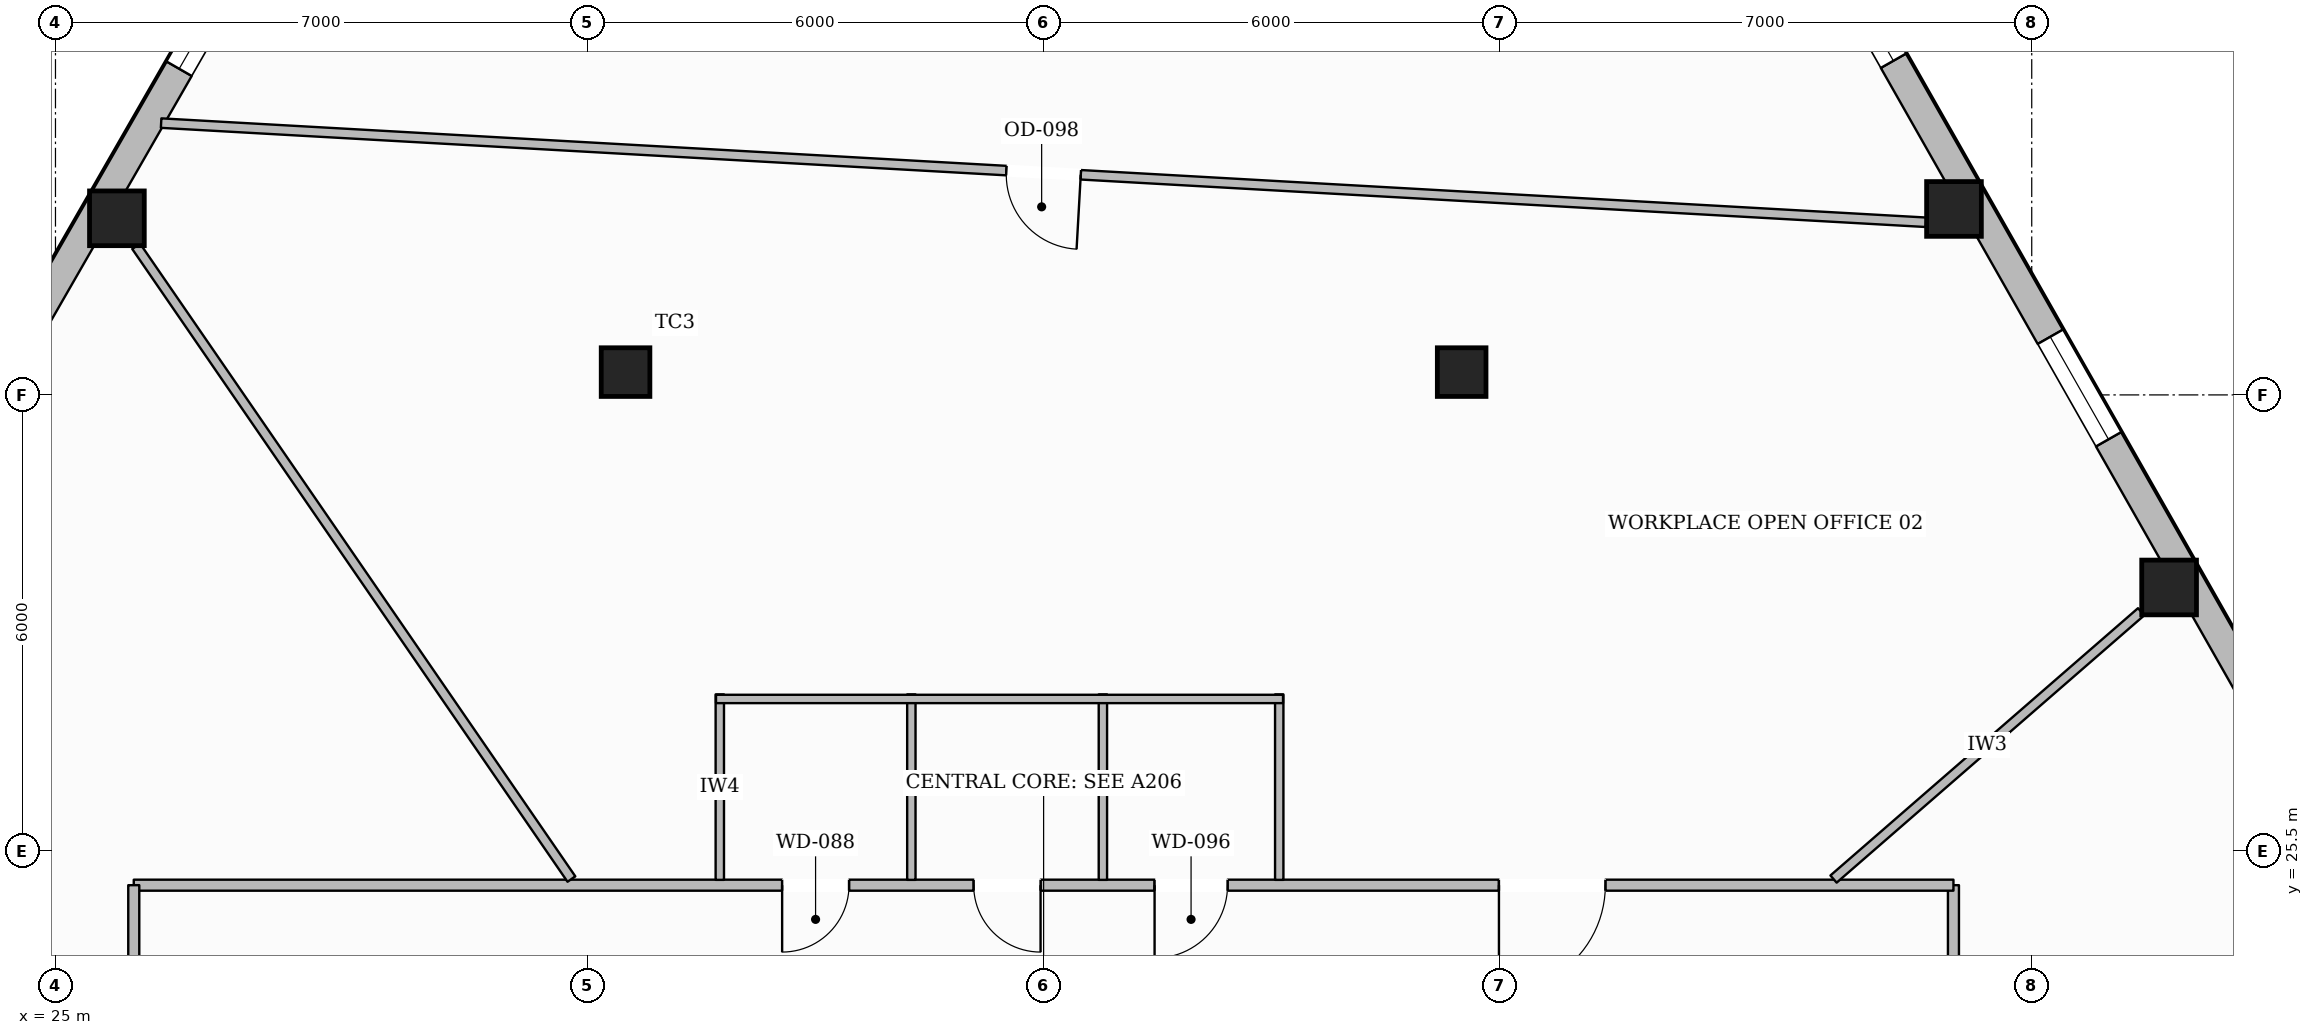
"""IFC4 building model, lengths in metres.
Left out: names, types, materials, properties, quantities, classifications, styles, units other than length and angle.
Written with IfcOpenShell. Run it as: python <this file> out.ifc"""

import sys

from ifc_helpers import new_model, si_unit, direction, frame, frame_2d, origin, origin_2d, place, context, subcontext, project, spatial, rectangle, hollow_rectangle, extrude, element, fill, save


model = new_model("IFC4")
c1 = context("Model", 3, precision=1e-05, world=origin(), true_north=direction((0.0, 1.0)))
c2 = subcontext(c1, "Body", "Model", "MODEL_VIEW")
j1 = project(units=[si_unit("LENGTHUNIT", "METRE"), si_unit("PLANEANGLEUNIT", "RADIAN")], contexts=[c1])
p1 = place(None, origin())
s1 = spatial("IfcSite", under=j1, at=p1, CompositionType="ELEMENT")
p2 = place(p1, origin())
s2 = spatial("IfcBuilding", under=s1, at=p2, CompositionType="ELEMENT")
p3 = place(p2, frame((0.0, 0.0, 85.5)))
s3 = spatial("IfcBuildingStorey", under=s2, at=p3, CompositionType="ELEMENT", Elevation=85.5)
for number, where, z_axis, x_axis in (
    (1, (25.808, 33.823, 0.0), (0.0, 0.0, 1.0), (1.0, 0.0, 0.0)),
    (2, (52.807, 28.967, 0.0), (0.0, 0.0, 1.0), (1.0, 0.0, 0.0)),
    (3, (49.977, 33.946, 0.0), (0.0, 0.0, 1.0), (1.0, 0.0, 0.0)),
):
    element("IfcColumn", number, at=place(p3, frame(where, z_axis=z_axis, x_axis=x_axis)), inside=s3, PredefinedType="COLUMN", context=c2, shape_type="SweptSolid", body=[
        extrude(hollow_rectangle(XDim=0.72, YDim=0.72, WallThickness=0.032, at=origin_2d()), origin(), (0.0, 0.0, 1.0), 3.6),
    ])
for number, where, z_axis, x_axis in (
    (4, (32.5, 31.8, 0.0), (0.0, 0.0, 1.0), (1.0, 0.0, 0.0)),
    (5, (43.5, 31.8, 0.0), (0.0, 0.0, 1.0), (1.0, 0.0, 0.0)),
):
    element("IfcColumn", number, at=place(p3, frame(where, z_axis=z_axis, x_axis=x_axis)), inside=s3, PredefinedType="COLUMN", context=c2, shape_type="SweptSolid", body=[
        extrude(hollow_rectangle(XDim=0.64, YDim=0.64, WallThickness=0.028, at=origin_2d()), origin(), (0.0, 0.0, 1.0), 3.6),
    ])
p4 = place(p3, frame((13.817, 13.509, 0.0), z_axis=(0.0, 0.0, 1.0), x_axis=(0.498436356308, 0.866926293701, 0.0)))
e6 = element("IfcWall", 6, at=p4, inside=s3, PredefinedType="STANDARD", context=c2, shape_type="SweptSolid", body=[
    extrude(rectangle(XDim=35.622, YDim=0.38, at=frame_2d((17.811, 0.0))), origin(), (0.0, 0.0, 1.0), 3.059),
])
p5 = place(p4, frame((31.481, 0.0, 0.65)))
e7 = element("IfcOpeningElement", 7, at=p5, cuts=e6, PredefinedType="OPENING", context=c2, shape_type="SweptSolid", body=[
    extrude(rectangle(XDim=1.55, YDim=1.75, at=frame_2d((0.775, 0.875))), frame((0.0, 0.2, 0.0), z_axis=(0.0, -1.0, 0.0), x_axis=(1.0, 0.0, 0.0)), (0.0, 0.0, 1.0), 0.4),
])
p6 = place(p4, frame((25.703, 0.0, 0.65)))
e8 = element("IfcOpeningElement", 8, at=p6, cuts=e6, PredefinedType="OPENING", context=c2, shape_type="SweptSolid", body=[
    extrude(rectangle(XDim=1.55, YDim=1.75, at=frame_2d((0.775, 0.875))), frame((0.0, 0.2, 0.0), z_axis=(0.0, -1.0, 0.0), x_axis=(1.0, 0.0, 0.0)), (0.0, 0.0, 1.0), 0.4),
])
p7 = place(p4, frame((14.146, 0.0, 0.65)))
e9 = element("IfcOpeningElement", 9, at=p7, cuts=e6, PredefinedType="OPENING", context=c2, shape_type="SweptSolid", body=[
    extrude(rectangle(XDim=1.55, YDim=1.75, at=frame_2d((0.775, 0.875))), frame((0.0, 0.2, 0.0), z_axis=(0.0, -1.0, 0.0), x_axis=(1.0, 0.0, 0.0)), (0.0, 0.0, 1.0), 0.4),
])
p8 = place(p4, frame((8.367, 0.0, 0.65)))
e10 = element("IfcOpeningElement", 10, at=p8, cuts=e6, PredefinedType="OPENING", context=c2, shape_type="SweptSolid", body=[
    extrude(rectangle(XDim=1.55, YDim=1.75, at=frame_2d((0.775, 0.875))), frame((0.0, 0.2, 0.0), z_axis=(0.0, -1.0, 0.0), x_axis=(1.0, 0.0, 0.0)), (0.0, 0.0, 1.0), 0.4),
])
p9 = place(p4, frame((2.589, 0.0, 0.65)))
e11 = element("IfcOpeningElement", 11, at=p9, cuts=e6, PredefinedType="OPENING", context=c2, shape_type="SweptSolid", body=[
    extrude(rectangle(XDim=1.55, YDim=1.75, at=frame_2d((0.775, 0.875))), frame((0.0, 0.2, 0.0), z_axis=(0.0, -1.0, 0.0), x_axis=(1.0, 0.0, 0.0)), (0.0, 0.0, 1.0), 0.4),
])
p10 = place(p3, frame((44.314, 44.458, 0.0), z_axis=(0.0, 0.0, 1.0), x_axis=(0.494118179016, -0.869394746456, 0.0)))
e12 = element("IfcWall", 12, at=p10, inside=s3, PredefinedType="STANDARD", context=c2, shape_type="SweptSolid", body=[
    extrude(rectangle(XDim=35.322, YDim=0.38, at=frame_2d((17.661, 0.0))), origin(), (0.0, 0.0, 1.0), 3.059),
])
p11 = place(p10, frame((31.209, 0.0, 0.65)))
e13 = element("IfcOpeningElement", 13, at=p11, cuts=e12, PredefinedType="OPENING", context=c2, shape_type="SweptSolid", body=[
    extrude(rectangle(XDim=1.55, YDim=1.75, at=frame_2d((0.775, 0.875))), frame((0.0, 0.2, 0.0), z_axis=(0.0, -1.0, 0.0), x_axis=(1.0, 0.0, 0.0)), (0.0, 0.0, 1.0), 0.4),
])
p12 = place(p10, frame((25.481, 0.0, 0.65)))
e14 = element("IfcOpeningElement", 14, at=p12, cuts=e12, PredefinedType="OPENING", context=c2, shape_type="SweptSolid", body=[
    extrude(rectangle(XDim=1.55, YDim=1.75, at=frame_2d((0.775, 0.875))), frame((0.0, 0.2, 0.0), z_axis=(0.0, -1.0, 0.0), x_axis=(1.0, 0.0, 0.0)), (0.0, 0.0, 1.0), 0.4),
])
p13 = place(p10, frame((14.025, 0.0, 0.65)))
e15 = element("IfcOpeningElement", 15, at=p13, cuts=e12, PredefinedType="OPENING", context=c2, shape_type="SweptSolid", body=[
    extrude(rectangle(XDim=1.55, YDim=1.75, at=frame_2d((0.775, 0.875))), frame((0.0, 0.2, 0.0), z_axis=(0.0, -1.0, 0.0), x_axis=(1.0, 0.0, 0.0)), (0.0, 0.0, 1.0), 0.4),
])
p14 = place(p10, frame((8.298, 0.0, 0.65)))
e16 = element("IfcOpeningElement", 16, at=p14, cuts=e12, PredefinedType="OPENING", context=c2, shape_type="SweptSolid", body=[
    extrude(rectangle(XDim=1.55, YDim=1.75, at=frame_2d((0.775, 0.875))), frame((0.0, 0.2, 0.0), z_axis=(0.0, -1.0, 0.0), x_axis=(1.0, 0.0, 0.0)), (0.0, 0.0, 1.0), 0.4),
])
p15 = place(p10, frame((2.57, 0.0, 0.65)))
e17 = element("IfcOpeningElement", 17, at=p15, cuts=e12, PredefinedType="OPENING", context=c2, shape_type="SweptSolid", body=[
    extrude(rectangle(XDim=1.55, YDim=1.75, at=frame_2d((0.775, 0.875))), frame((0.0, 0.2, 0.0), z_axis=(0.0, -1.0, 0.0), x_axis=(1.0, 0.0, 0.0)), (0.0, 0.0, 1.0), 0.4),
])
p16 = place(p3, frame((49.97, 7.15, 0.0), z_axis=(0.0, 0.0, 1.0), x_axis=(0.0, 1.0, 0.0)))
e18 = element("IfcWall", 18, at=p16, inside=s3, PredefinedType="PARTITIONING", context=c2, shape_type="SweptSolid", body=[
    extrude(rectangle(XDim=17.9, YDim=0.145, at=frame_2d((8.95, 0.0))), origin(), (0.0, 0.0, 1.0), 3.288),
])
p17 = place(p16, frame((9.446, 0.0, 0.0)))
e19 = element("IfcOpeningElement", 19, at=p17, cuts=e18, PredefinedType="OPENING", context=c2, shape_type="SweptSolid", body=[
    extrude(rectangle(XDim=1.4, YDim=2.2, at=frame_2d((0.7, 1.1))), frame((0.0, 0.083, 0.0), z_axis=(0.0, -1.0, 0.0), x_axis=(1.0, 0.0, 0.0)), (0.0, 0.0, 1.0), 0.165),
])
p18 = place(p3, frame((49.97, 25.05, 0.0), z_axis=(0.0, 0.0, 1.0), x_axis=(-1.0, 0.0, 0.0)))
e20 = element("IfcWall", 20, at=p18, inside=s3, PredefinedType="PARTITIONING", context=c2, shape_type="SweptSolid", body=[
    extrude(rectangle(XDim=23.94, YDim=0.145, at=frame_2d((11.97, 0.0))), origin(), (0.0, 0.0, 1.0), 3.6),
])
p19 = place(p18, frame((14.53, 0.0, 0.0)))
e21 = element("IfcOpeningElement", 21, at=p19, cuts=e20, PredefinedType="OPENING", context=c2, shape_type="SweptSolid", body=[
    extrude(rectangle(XDim=0.88, YDim=2.1, at=frame_2d((0.44, 1.05))), frame((0.0, 0.083, 0.0), z_axis=(0.0, -1.0, 0.0), x_axis=(1.0, 0.0, 0.0)), (0.0, 0.0, 1.0), 0.165),
])
p20 = place(p18, frame((12.01, 0.0, 0.0)))
e22 = element("IfcOpeningElement", 22, at=p20, cuts=e20, PredefinedType="OPENING", context=c2, shape_type="SweptSolid", body=[
    extrude(rectangle(XDim=0.88, YDim=2.1, at=frame_2d((0.44, 1.05))), frame((0.0, 0.083, 0.0), z_axis=(0.0, -1.0, 0.0), x_axis=(1.0, 0.0, 0.0)), (0.0, 0.0, 1.0), 0.165),
])
p21 = place(p18, frame((9.55, 0.0, 0.0)))
e23 = element("IfcOpeningElement", 23, at=p21, cuts=e20, PredefinedType="OPENING", context=c2, shape_type="SweptSolid", body=[
    extrude(rectangle(XDim=0.96, YDim=2.1, at=frame_2d((0.48, 1.05))), frame((0.0, 0.083, 0.0), z_axis=(0.0, -1.0, 0.0), x_axis=(1.0, 0.0, 0.0)), (0.0, 0.0, 1.0), 0.165),
])
p22 = place(p18, frame((4.58, 0.0, 0.0)))
e24 = element("IfcOpeningElement", 24, at=p22, cuts=e20, PredefinedType="OPENING", context=c2, shape_type="SweptSolid", body=[
    extrude(rectangle(XDim=1.4, YDim=2.2, at=frame_2d((0.7, 1.1))), frame((0.0, 0.083, 0.0), z_axis=(0.0, -1.0, 0.0), x_axis=(1.0, 0.0, 0.0)), (0.0, 0.0, 1.0), 0.165),
])
p23 = place(p3, frame((26.03, 25.05, 0.0), z_axis=(0.0, 0.0, 1.0), x_axis=(0.0, -1.0, 0.0)))
e25 = element("IfcWall", 25, at=p23, inside=s3, PredefinedType="PARTITIONING", context=c2, shape_type="SweptSolid", body=[
    extrude(rectangle(XDim=17.9, YDim=0.145, at=frame_2d((8.95, 0.0))), origin(), (0.0, 0.0, 1.0), 3.288),
])
p24 = place(p23, frame((4.717, 0.0, 0.0)))
e26 = element("IfcOpeningElement", 26, at=p24, cuts=e25, PredefinedType="OPENING", context=c2, shape_type="SweptSolid", body=[
    extrude(rectangle(XDim=1.4, YDim=2.2, at=frame_2d((0.7, 1.1))), frame((0.0, 0.083, 0.0), z_axis=(0.0, -1.0, 0.0), x_axis=(1.0, 0.0, 0.0)), (0.0, 0.0, 1.0), 0.165),
])
for number, where, z_axis, x_axis in (
    (27, (33.74, 25.12, 0.0), (0.0, 0.0, 1.0), (0.0, 1.0, 0.0)),
    (28, (36.26, 25.12, 0.0), (0.0, 0.0, 1.0), (0.0, 1.0, 0.0)),
    (29, (38.78, 25.12, 0.0), (0.0, 0.0, 1.0), (0.0, 1.0, 0.0)),
    (30, (41.1, 25.12, 0.0), (0.0, 0.0, 1.0), (0.0, 1.0, 0.0)),
):
    element("IfcWall", number, at=place(p3, frame(where, z_axis=z_axis, x_axis=x_axis)), inside=s3, PredefinedType="PLUMBINGWALL", context=c2, shape_type="SweptSolid", body=[
        extrude(rectangle(XDim=2.44, YDim=0.11, at=frame_2d((1.22, 0.0))), origin(), (0.0, 0.0, 1.0), 3.6),
    ])
p25 = place(p3, frame((33.69, 27.5, 0.0), z_axis=(0.0, 0.0, 1.0), x_axis=(1.0, 0.0, 0.0)))
e31 = element("IfcWall", 31, at=p25, inside=s3, PredefinedType="PLUMBINGWALL", context=c2, shape_type="SweptSolid", body=[
    extrude(rectangle(XDim=7.46, YDim=0.11, at=frame_2d((3.73, 0.0))), origin(), (0.0, 0.0, 1.0), 3.6),
])
p26 = place(p3, frame((48.392, 25.131, 0.0), z_axis=(0.0, 0.0, 1.0), x_axis=(0.754851545416, 0.655895681022, 0.0)))
e32 = element("IfcWall", 32, at=p26, inside=s3, PredefinedType="PARTITIONING", context=c2, shape_type="SweptSolid", body=[
    extrude(rectangle(XDim=5.361, YDim=0.125, at=frame_2d((2.681, 0.0))), origin(), (0.0, 0.0, 1.0), 3.141),
])
p27 = place(p3, frame((31.788, 25.131, 0.0), z_axis=(0.0, 0.0, 1.0), x_axis=(-0.566752351953, 0.823888203312, 0.0)))
e33 = element("IfcWall", 33, at=p27, inside=s3, PredefinedType="PARTITIONING", context=c2, shape_type="SweptSolid", body=[
    extrude(rectangle(XDim=10.104, YDim=0.125, at=frame_2d((5.052, 0.0))), origin(), (0.0, 0.0, 1.0), 3.6),
])
p28 = place(p3, frame((49.609, 33.771, 0.0), z_axis=(0.0, 0.0, 1.0), x_axis=(-0.998425040952, 0.056102028483, 0.0)))
e34 = element("IfcWall", 34, at=p28, inside=s3, PredefinedType="PARTITIONING", context=c2, shape_type="SweptSolid", body=[
    extrude(rectangle(XDim=23.256, YDim=0.125, at=frame_2d((11.628, 0.0))), origin(), (0.0, 0.0, 1.0), 3.6),
])
p29 = place(p28, frame((11.138, 0.0, 0.0)))
e35 = element("IfcOpeningElement", 35, at=p29, cuts=e34, PredefinedType="OPENING", context=c2, shape_type="SweptSolid", body=[
    extrude(rectangle(XDim=0.98, YDim=2.15, at=frame_2d((0.49, 1.075))), frame((0.0, 0.073, 0.0), z_axis=(0.0, -1.0, 0.0), x_axis=(1.0, 0.0, 0.0)), (0.0, 0.0, 1.0), 0.145),
])
p30 = place(p6, origin())
e36 = element("IfcWindow", 36, at=p30, inside=s3, PartitioningType="SINGLE_PANEL", PredefinedType="WINDOW", context=c2, shape_type="SweptSolid", body=[
    extrude(rectangle(XDim=1.55, YDim=1.75, at=frame_2d((0.775, 0.875))), frame((0.0, 0.03, 0.0), z_axis=(0.0, -1.0, 0.0), x_axis=(1.0, 0.0, 0.0)), (0.0, 0.0, 1.0), 0.06),
])
fill(e8, e36)
p31 = place(p13, origin())
e37 = element("IfcWindow", 37, at=p31, inside=s3, PartitioningType="SINGLE_PANEL", PredefinedType="WINDOW", context=c2, shape_type="SweptSolid", body=[
    extrude(rectangle(XDim=1.55, YDim=1.75, at=frame_2d((0.775, 0.875))), frame((0.0, 0.03, 0.0), z_axis=(0.0, -1.0, 0.0), x_axis=(1.0, 0.0, 0.0)), (0.0, 0.0, 1.0), 0.06),
])
fill(e15, e37)
p32 = place(p14, origin())
e38 = element("IfcWindow", 38, at=p32, inside=s3, PartitioningType="SINGLE_PANEL", PredefinedType="WINDOW", context=c2, shape_type="SweptSolid", body=[
    extrude(rectangle(XDim=1.55, YDim=1.75, at=frame_2d((0.775, 0.875))), frame((0.0, 0.03, 0.0), z_axis=(0.0, -1.0, 0.0), x_axis=(1.0, 0.0, 0.0)), (0.0, 0.0, 1.0), 0.06),
])
fill(e16, e38)
p33 = place(p19, origin())
e39 = element("IfcDoor", 39, at=p33, inside=s3, OperationType="SINGLE_SWING_RIGHT", PredefinedType="DOOR", context=c2, shape_type="SweptSolid", body=[
    extrude(rectangle(XDim=0.88, YDim=2.1, at=frame_2d((0.44, 1.05))), frame((0.0, 0.025, 0.0), z_axis=(0.0, -1.0, 0.0), x_axis=(1.0, 0.0, 0.0)), (0.0, 0.0, 1.0), 0.05),
])
fill(e21, e39)
p34 = place(p20, origin())
e40 = element("IfcDoor", 40, at=p34, inside=s3, OperationType="SINGLE_SWING_LEFT", PredefinedType="DOOR", context=c2, shape_type="SweptSolid", body=[
    extrude(rectangle(XDim=0.88, YDim=2.1, at=frame_2d((0.44, 1.05))), frame((0.0, 0.025, 0.0), z_axis=(0.0, -1.0, 0.0), x_axis=(1.0, 0.0, 0.0)), (0.0, 0.0, 1.0), 0.05),
])
fill(e22, e40)
p35 = place(p21, origin())
e41 = element("IfcDoor", 41, at=p35, inside=s3, OperationType="SINGLE_SWING_RIGHT", PredefinedType="DOOR", context=c2, shape_type="SweptSolid", body=[
    extrude(rectangle(XDim=0.96, YDim=2.1, at=frame_2d((0.48, 1.05))), frame((0.0, 0.025, 0.0), z_axis=(0.0, -1.0, 0.0), x_axis=(1.0, 0.0, 0.0)), (0.0, 0.0, 1.0), 0.05),
])
fill(e23, e41)
p36 = place(p22, origin())
e42 = element("IfcDoor", 42, at=p36, inside=s3, OperationType="SINGLE_SWING_RIGHT", PredefinedType="DOOR", context=c2, shape_type="SweptSolid", body=[
    extrude(rectangle(XDim=1.4, YDim=2.2, at=frame_2d((0.7, 1.1))), frame((0.0, 0.025, 0.0), z_axis=(0.0, -1.0, 0.0), x_axis=(1.0, 0.0, 0.0)), (0.0, 0.0, 1.0), 0.05),
])
fill(e24, e42)
p37 = place(p29, origin())
e43 = element("IfcDoor", 43, at=p37, inside=s3, OperationType="SINGLE_SWING_LEFT", PredefinedType="DOOR", context=c2, shape_type="SweptSolid", body=[
    extrude(rectangle(XDim=0.98, YDim=2.15, at=frame_2d((0.49, 1.075))), frame((0.0, 0.025, 0.0), z_axis=(0.0, -1.0, 0.0), x_axis=(1.0, 0.0, 0.0)), (0.0, 0.0, 1.0), 0.05),
])
fill(e35, e43)
save(model, sys.argv[1])
